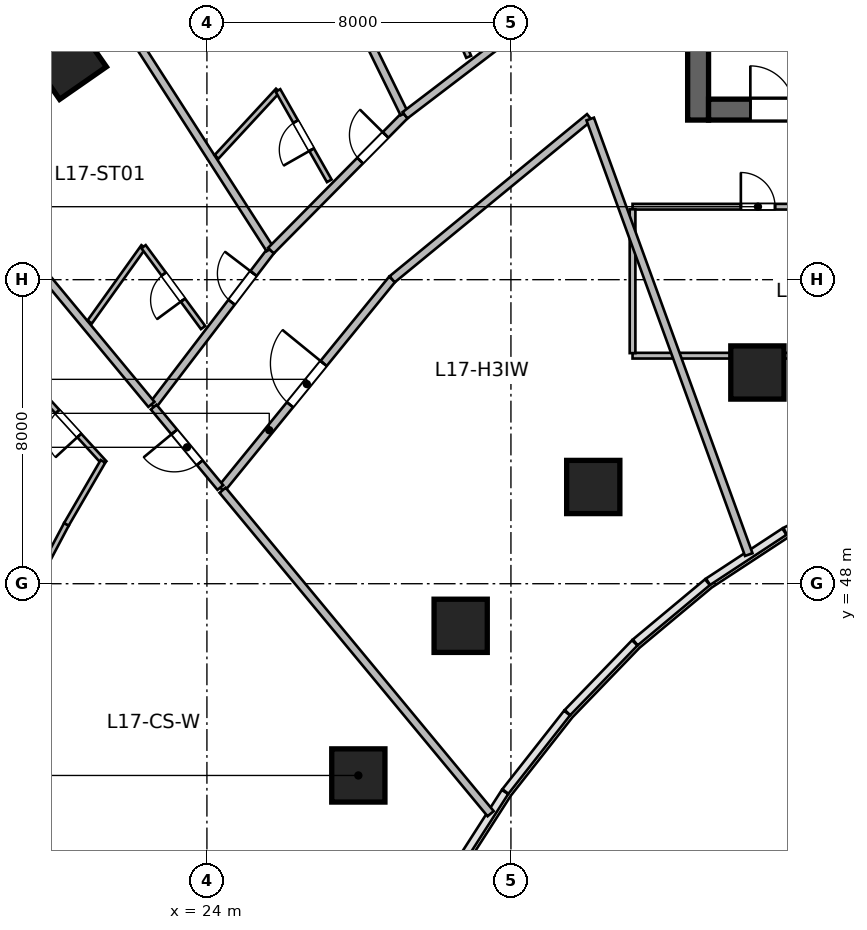
"""IFC4 building model, lengths in metres.
Left out: names, types, materials, properties, quantities, classifications, styles, units other than length and angle.
Written with IfcOpenShell. Run it as: python <this file> out.ifc"""

import sys

from ifc_helpers import new_model, si_unit, direction, frame, frame_2d, origin, origin_2d, place, context, subcontext, project, spatial, rectangle, circle, extrude, source, transform, mapped, element, fill, save


model = new_model("IFC4")
c1 = context("Model", 3, precision=1e-05, world=origin(), true_north=direction((0.0, 1.0)))
c2 = subcontext(c1, "Body", "Model", "MODEL_VIEW")
j1 = project(units=[si_unit("LENGTHUNIT", "METRE"), si_unit("PLANEANGLEUNIT", "RADIAN")], contexts=[c1])
p1 = place(None, origin())
s1 = spatial("IfcSite", under=j1, at=p1, CompositionType="ELEMENT")
p2 = place(p1, origin())
s2 = spatial("IfcBuilding", under=s1, at=p2, CompositionType="ELEMENT")
p3 = place(p2, frame((0.0, 0.0, 75.0)))
s3 = spatial("IfcBuildingStorey", under=s2, at=p3, CompositionType="ELEMENT", Elevation=75.0)
m1 = source(origin(), c2, "Body", "SweptSolid", [
    extrude(rectangle(XDim=12.0, YDim=0.55, at=frame_2d((6.0, 0.0))), origin(), (0.0, 0.0, 1.0), 3.6),
])
p4 = place(p3, frame((36.925, 60.2, 0.0), z_axis=(0.0, 0.0, 1.0), x_axis=(0.0, 1.0, 0.0)))
e1 = element("IfcWall", 1, at=p4, inside=s3, PredefinedType="SHEAR", context=c2, shape_type="MappedRepresentation", body=[
    mapped(m1, transform((0.0, 0.0, 0.0), scale=1.0)),
])
m2 = source(origin(), c2, "Body", "SweptSolid", [
    extrude(rectangle(XDim=21.6, YDim=0.55, at=frame_2d((10.8, 0.0))), origin(), (0.0, 0.0, 1.0), 3.6),
])
p5 = place(p3, frame((37.2, 60.475, 0.0), z_axis=(0.0, 0.0, 1.0), x_axis=(1.0, 0.0, 0.0)))
e2 = element("IfcWall", 2, at=p5, inside=s3, PredefinedType="SHEAR", context=c2, shape_type="MappedRepresentation", body=[
    mapped(m2, transform((0.0, 0.0, 0.0), scale=1.0)),
])
p6 = place(p5, frame((1.1, 0.0, 0.0)))
e3 = element("IfcOpeningElement", 3, at=p6, cuts=e2, PredefinedType="OPENING", context=c2, shape_type="SweptSolid", body=[
    extrude(rectangle(XDim=1.15, YDim=2.15, at=frame_2d((0.575, 1.075))), frame((0.0, 0.285, 0.0), z_axis=(0.0, -1.0, 0.0), x_axis=(1.0, 0.0, 0.0)), (0.0, 0.0, 1.0), 0.57),
])
p7 = place(p5, frame((19.5, 0.0, 0.0)))
e4 = element("IfcOpeningElement", 4, at=p7, cuts=e2, PredefinedType="OPENING", context=c2, shape_type="SweptSolid", body=[
    extrude(rectangle(XDim=0.9, YDim=2.1, at=frame_2d((0.45, 1.05))), frame((0.0, 0.285, 0.0), z_axis=(0.0, -1.0, 0.0), x_axis=(1.0, 0.0, 0.0)), (0.0, 0.0, 1.0), 0.57),
])
p8 = place(p5, frame((12.02, 0.0, 0.0)))
e5 = element("IfcOpeningElement", 5, at=p8, cuts=e2, PredefinedType="OPENING", context=c2, shape_type="SweptSolid", body=[
    extrude(rectangle(XDim=1.6, YDim=2.15, at=frame_2d((0.8, 1.075))), frame((0.0, 0.285, 0.0), z_axis=(0.0, -1.0, 0.0), x_axis=(1.0, 0.0, 0.0)), (0.0, 0.0, 1.0), 0.57),
])
m3 = source(origin(), c2, "Body", "SweptSolid", [
    extrude(circle(Radius=0.7, at=origin_2d()), origin(), (0.0, 0.0, 1.0), 3.6),
])
for number, where, z_axis, x_axis in (
    (6, (27.985, 42.955, 0.0), (0.0, 0.0, 1.0), (-0.691, 0.723, 0.0)),
    (7, (30.677, 46.892, 0.0), (0.0, 0.0, 1.0), (-0.571, 0.821, 0.0)),
):
    element("IfcColumn", number, at=place(p3, frame(where, z_axis=z_axis, x_axis=x_axis)), inside=s3, PredefinedType="COLUMN", context=c2, shape_type="MappedRepresentation", body=[
        mapped(m3, transform((0.0, 0.0, 0.0), scale=1.0)),
    ])
m4 = source(origin(), c2, "Body", "SweptSolid", [
    extrude(rectangle(XDim=1.5, YDim=1.5, at=origin_2d()), origin(), (0.0, 0.0, 1.0), 3.6),
])
p9 = place(p3, frame((20.311, 61.789, 0.0), z_axis=(0.0, 0.0, 1.0), x_axis=(-0.571143442153, 0.820850271661, 0.0)))
e8 = element("IfcColumn", 8, at=p9, inside=s3, PredefinedType="COLUMN", context=c2, shape_type="MappedRepresentation", body=[
    mapped(m4, transform((0.0, 0.0, 0.0), scale=1.0)),
])
for number, where, z_axis, x_axis in (
    (9, (34.166, 50.545, 0.0), (0.0, 0.0, 1.0), (-0.436, 0.9, 0.0)),
    (10, (38.485, 53.558, 0.0), (0.0, 0.0, 1.0), (-0.289, 0.957, 0.0)),
):
    element("IfcColumn", number, at=place(p3, frame(where, z_axis=z_axis, x_axis=x_axis)), inside=s3, PredefinedType="COLUMN", context=c2, shape_type="MappedRepresentation", body=[
        mapped(m3, transform((0.0, 0.0, 0.0), scale=1.0)),
    ])
m5 = source(origin(), c2, "Body", "SweptSolid", [
    extrude(rectangle(XDim=6.6, YDim=0.15, at=frame_2d((3.3, 0.0))), origin(), (0.0, 0.0, 1.0), 2.803),
])
p10 = place(p3, frame((35.2, 54.0, 0.0), z_axis=(0.0, 0.0, 1.0), x_axis=(1.0, 0.0, 0.0)))
e11 = element("IfcWall", 11, at=p10, inside=s3, PredefinedType="PARTITIONING", context=c2, shape_type="MappedRepresentation", body=[
    mapped(m5, transform((0.0, 0.0, 0.0), scale=1.0)),
])
m6 = source(origin(), c2, "Body", "SweptSolid", [
    extrude(rectangle(XDim=6.6, YDim=0.15, at=frame_2d((3.3, 0.0))), origin(), (0.0, 0.0, 1.0), 3.36),
])
p11 = place(p3, frame((35.2, 57.92, 0.0), z_axis=(0.0, 0.0, 1.0), x_axis=(1.0, 0.0, 0.0)))
e12 = element("IfcWall", 12, at=p11, inside=s3, PredefinedType="PARTITIONING", context=c2, shape_type="MappedRepresentation", body=[
    mapped(m6, transform((0.0, 0.0, 0.0), scale=1.0)),
])
p12 = place(p11, frame((2.85, 0.0, 0.0)))
e13 = element("IfcOpeningElement", 13, at=p12, cuts=e12, PredefinedType="OPENING", context=c2, shape_type="SweptSolid", body=[
    extrude(rectangle(XDim=0.9, YDim=2.1, at=frame_2d((0.45, 1.05))), frame((0.0, 0.085, 0.0), z_axis=(0.0, -1.0, 0.0), x_axis=(1.0, 0.0, 0.0)), (0.0, 0.0, 1.0), 0.17),
])
m7 = source(origin(), c2, "Body", "SweptSolid", [
    extrude(rectangle(XDim=3.785, YDim=0.15, at=frame_2d((1.893, 0.0))), origin(), (0.0, 0.0, 1.0), 3.36),
])
p13 = place(p3, frame((35.2, 54.067, 0.0), z_axis=(0.0, 0.0, 1.0), x_axis=(0.0, 1.0, 0.0)))
e14 = element("IfcWall", 14, at=p13, inside=s3, PredefinedType="PARTITIONING", context=c2, shape_type="MappedRepresentation", body=[
    mapped(m7, transform((0.0, 0.0, 0.0), scale=1.0)),
])
m8 = source(origin(), c2, "Body", "SweptSolid", [
    extrude(rectangle(XDim=7.113, YDim=0.21, at=frame_2d((3.556, 0.0))), origin(), (0.0, 0.0, 1.0), 3.36),
])
p14 = place(p3, frame((24.383, 50.495, 0.0), z_axis=(0.0, 0.0, 1.0), x_axis=(0.63149032532, 0.775383755974, 0.0)))
e15 = element("IfcWall", 15, at=p14, inside=s3, PredefinedType="PARTITIONING", context=c2, shape_type="MappedRepresentation", body=[
    mapped(m8, transform((0.0, 0.0, 0.0), scale=1.0)),
])
p15 = place(p14, frame((2.856, 0.0, 0.0)))
e16 = element("IfcOpeningElement", 16, at=p15, cuts=e15, PredefinedType="OPENING", context=c2, shape_type="SweptSolid", body=[
    extrude(rectangle(XDim=1.4, YDim=2.15, at=frame_2d((0.7, 1.075))), frame((0.0, 0.115, 0.0), z_axis=(0.0, -1.0, 0.0), x_axis=(1.0, 0.0, 0.0)), (0.0, 0.0, 1.0), 0.23),
])
m9 = source(origin(), c2, "Body", "SweptSolid", [
    extrude(rectangle(XDim=6.721, YDim=0.21, at=frame_2d((3.361, 0.0))), origin(), (0.0, 0.0, 1.0), 3.36),
])
p16 = place(p3, frame((28.874, 56.01, 0.0), z_axis=(0.0, 0.0, 1.0), x_axis=(0.772828051199, 0.63461547671, 0.0)))
e17 = element("IfcWall", 17, at=p16, inside=s3, PredefinedType="PARTITIONING", context=c2, shape_type="MappedRepresentation", body=[
    mapped(m9, transform((0.0, 0.0, 0.0), scale=1.0)),
])
m10 = source(origin(), c2, "Body", "SweptSolid", [
    extrude(rectangle(XDim=11.053, YDim=0.21, at=frame_2d((5.527, 0.0))), origin(), (0.0, 0.0, 1.0), 3.36),
])
p17 = place(p3, frame((31.466, 41.949, 0.0), z_axis=(0.0, 0.0, 1.0), x_axis=(-0.638131235571, 0.769927611005, 0.0)))
e18 = element("IfcWall", 18, at=p17, inside=s3, PredefinedType="PARTITIONING", context=c2, shape_type="MappedRepresentation", body=[
    mapped(m10, transform((0.0, 0.0, 0.0), scale=1.0)),
])
m11 = source(origin(), c2, "Body", "SweptSolid", [
    extrude(rectangle(XDim=12.196, YDim=0.21, at=frame_2d((6.098, 0.0))), origin(), (0.0, 0.0, 1.0), 3.36),
])
p18 = place(p3, frame((38.258, 48.766, 0.0), z_axis=(0.0, 0.0, 1.0), x_axis=(-0.342022711534, 0.939691686031, 0.0)))
e19 = element("IfcWall", 19, at=p18, inside=s3, PredefinedType="PARTITIONING", context=c2, shape_type="MappedRepresentation", body=[
    mapped(m11, transform((0.0, 0.0, 0.0), scale=1.0)),
])
m12 = source(origin(), c2, "Body", "SweptSolid", [
    extrude(rectangle(XDim=5.135, YDim=0.21, at=frame_2d((2.567, 0.0))), origin(), (0.0, 0.0, 1.0), 3.36),
])
p19 = place(p3, frame((22.57, 52.683, 0.0), z_axis=(0.0, 0.0, 1.0), x_axis=(0.606802199649, 0.794852873494, 0.0)))
e20 = element("IfcWall", 20, at=p19, inside=s3, PredefinedType="PARTITIONING", context=c2, shape_type="MappedRepresentation", body=[
    mapped(m12, transform((0.0, 0.0, 0.0), scale=1.0)),
])
p20 = place(p19, frame((3.427, 0.0, 0.0)))
e21 = element("IfcOpeningElement", 21, at=p20, cuts=e20, PredefinedType="OPENING", context=c2, shape_type="SweptSolid", body=[
    extrude(rectangle(XDim=0.95, YDim=2.15, at=frame_2d((0.475, 1.075))), frame((0.0, 0.115, 0.0), z_axis=(0.0, -1.0, 0.0), x_axis=(1.0, 0.0, 0.0)), (0.0, 0.0, 1.0), 0.23),
])
m13 = source(origin(), c2, "Body", "SweptSolid", [
    extrude(rectangle(XDim=10.975, YDim=0.21, at=frame_2d((5.487, 0.0))), origin(), (0.0, 0.0, 1.0), 3.36),
])
p21 = place(p3, frame((22.54, 52.719, 0.0), z_axis=(0.0, 0.0, 1.0), x_axis=(-0.638125265812, 0.769932558821, 0.0)))
e22 = element("IfcWall", 22, at=p21, inside=s3, PredefinedType="PARTITIONING", context=c2, shape_type="MappedRepresentation", body=[
    mapped(m13, transform((0.0, 0.0, 0.0), scale=1.0)),
])
m14 = source(origin(), c2, "Body", "SweptSolid", [
    extrude(rectangle(XDim=11.432, YDim=0.21, at=frame_2d((5.716, 0.0))), origin(), (0.0, 0.0, 1.0), 3.36),
])
p22 = place(p3, frame((25.659, 56.805, 0.0), z_axis=(0.0, 0.0, 1.0), x_axis=(-0.540196183124, 0.841539115988, 0.0)))
e23 = element("IfcWall", 23, at=p22, inside=s3, PredefinedType="PARTITIONING", context=c2, shape_type="MappedRepresentation", body=[
    mapped(m14, transform((0.0, 0.0, 0.0), scale=1.0)),
])
m15 = source(origin(), c2, "Body", "SweptSolid", [
    extrude(rectangle(XDim=2.437, YDim=0.14, at=frame_2d((1.218, 0.0))), origin(), (0.0, 0.0, 1.0), 3.36),
])
p23 = place(p3, frame((20.915, 54.886, 0.0), z_axis=(0.0, 0.0, 1.0), x_axis=(0.581797219134, 0.813333877204, 0.0)))
e24 = element("IfcWall", 24, at=p23, inside=s3, PredefinedType="PARTITIONING", context=c2, shape_type="MappedRepresentation", body=[
    mapped(m15, transform((0.0, 0.0, 0.0), scale=1.0)),
])
m16 = source(origin(), c2, "Body", "SweptSolid", [
    extrude(rectangle(XDim=2.642, YDim=0.14, at=frame_2d((1.321, 0.0))), origin(), (0.0, 0.0, 1.0), 3.36),
])
p24 = place(p3, frame((23.899, 54.741, 0.0), z_axis=(0.0, 0.0, 1.0), x_axis=(-0.592789122423, 0.805357719487, 0.0)))
e25 = element("IfcWall", 25, at=p24, inside=s3, PredefinedType="PARTITIONING", context=c2, shape_type="MappedRepresentation", body=[
    mapped(m16, transform((0.0, 0.0, 0.0), scale=1.0)),
])
p25 = place(p24, frame((0.896, 0.0, 0.0)))
e26 = element("IfcOpeningElement", 26, at=p25, cuts=e25, PredefinedType="OPENING", context=c2, shape_type="SweptSolid", body=[
    extrude(rectangle(XDim=0.85, YDim=2.05, at=frame_2d((0.425, 1.025))), frame((0.0, 0.08, 0.0), z_axis=(0.0, -1.0, 0.0), x_axis=(1.0, 0.0, 0.0)), (0.0, 0.0, 1.0), 0.16),
])
m17 = source(origin(), c2, "Body", "SweptSolid", [
    extrude(rectangle(XDim=5.012, YDim=0.21, at=frame_2d((2.506, 0.0))), origin(), (0.0, 0.0, 1.0), 3.36),
])
p26 = place(p3, frame((25.685, 56.764, 0.0), z_axis=(0.0, 0.0, 1.0), x_axis=(0.703664626435, 0.710532260707, 0.0)))
e27 = element("IfcWall", 27, at=p26, inside=s3, PredefinedType="PARTITIONING", context=c2, shape_type="MappedRepresentation", body=[
    mapped(m17, transform((0.0, 0.0, 0.0), scale=1.0)),
])
p27 = place(p26, frame((3.335, 0.0, 0.0)))
e28 = element("IfcOpeningElement", 28, at=p27, cuts=e27, PredefinedType="OPENING", context=c2, shape_type="SweptSolid", body=[
    extrude(rectangle(XDim=0.95, YDim=2.15, at=frame_2d((0.475, 1.075))), frame((0.0, 0.115, 0.0), z_axis=(0.0, -1.0, 0.0), x_axis=(1.0, 0.0, 0.0)), (0.0, 0.0, 1.0), 0.23),
])
m18 = source(origin(), c2, "Body", "SweptSolid", [
    extrude(rectangle(XDim=11.775, YDim=0.21, at=frame_2d((5.887, 0.0))), origin(), (0.0, 0.0, 1.0), 2.644),
])
p28 = place(p3, frame((29.19, 60.371, 0.0), z_axis=(0.0, 0.0, 1.0), x_axis=(-0.4401500056, 0.897924257702, 0.0)))
e29 = element("IfcWall", 29, at=p28, inside=s3, PredefinedType="PARTITIONING", context=c2, shape_type="MappedRepresentation", body=[
    mapped(m18, transform((0.0, 0.0, 0.0), scale=1.0)),
])
m19 = source(origin(), c2, "Body", "SweptSolid", [
    extrude(rectangle(XDim=2.38, YDim=0.14, at=frame_2d((1.19, 0.0))), origin(), (0.0, 0.0, 1.0), 3.36),
])
p29 = place(p3, frame((24.253, 59.231, 0.0), z_axis=(0.0, 0.0, 1.0), x_axis=(0.679084816758, 0.734059814762, 0.0)))
e30 = element("IfcWall", 30, at=p29, inside=s3, PredefinedType="PARTITIONING", context=c2, shape_type="MappedRepresentation", body=[
    mapped(m19, transform((0.0, 0.0, 0.0), scale=1.0)),
])
m20 = source(origin(), c2, "Body", "SweptSolid", [
    extrude(rectangle(XDim=2.735, YDim=0.14, at=frame_2d((1.367, 0.0))), origin(), (0.0, 0.0, 1.0), 3.36),
])
p30 = place(p3, frame((27.219, 58.6, 0.0), z_axis=(0.0, 0.0, 1.0), x_axis=(-0.493694940578, 0.869635156631, 0.0)))
e31 = element("IfcWall", 31, at=p30, inside=s3, PredefinedType="PARTITIONING", context=c2, shape_type="MappedRepresentation", body=[
    mapped(m20, transform((0.0, 0.0, 0.0), scale=1.0)),
])
p31 = place(p30, frame((0.942, 0.0, 0.0)))
e32 = element("IfcOpeningElement", 32, at=p31, cuts=e31, PredefinedType="OPENING", context=c2, shape_type="SweptSolid", body=[
    extrude(rectangle(XDim=0.85, YDim=2.05, at=frame_2d((0.425, 1.025))), frame((0.0, 0.08, 0.0), z_axis=(0.0, -1.0, 0.0), x_axis=(1.0, 0.0, 0.0)), (0.0, 0.0, 1.0), 0.16),
])
m21 = source(origin(), c2, "Body", "SweptSolid", [
    extrude(rectangle(XDim=4.762, YDim=0.21, at=frame_2d((2.381, 0.0))), origin(), (0.0, 0.0, 1.0), 3.36),
])
p32 = place(p3, frame((29.212, 60.326, 0.0), z_axis=(0.0, 0.0, 1.0), x_axis=(0.795070295872, 0.60651729128, 0.0)))
e33 = element("IfcWall", 33, at=p32, inside=s3, PredefinedType="PARTITIONING", context=c2, shape_type="MappedRepresentation", body=[
    mapped(m21, transform((0.0, 0.0, 0.0), scale=1.0)),
])
p33 = place(p32, frame((3.144, 0.0, 0.0)))
e34 = element("IfcOpeningElement", 34, at=p33, cuts=e33, PredefinedType="OPENING", context=c2, shape_type="SweptSolid", body=[
    extrude(rectangle(XDim=0.95, YDim=2.15, at=frame_2d((0.475, 1.075))), frame((0.0, 0.115, 0.0), z_axis=(0.0, -1.0, 0.0), x_axis=(1.0, 0.0, 0.0)), (0.0, 0.0, 1.0), 0.23),
])
m22 = source(origin(), c2, "Body", "SweptSolid", [
    extrude(rectangle(XDim=2.819, YDim=0.14, at=frame_2d((1.409, 0.0))), origin(), (0.0, 0.0, 1.0), 3.36),
])
p34 = place(p3, frame((30.888, 61.864, 0.0), z_axis=(0.0, 0.0, 1.0), x_axis=(-0.394420979357, 0.918929861874, 0.0)))
e35 = element("IfcWall", 35, at=p34, inside=s3, PredefinedType="PARTITIONING", context=c2, shape_type="MappedRepresentation", body=[
    mapped(m22, transform((0.0, 0.0, 0.0), scale=1.0)),
])
p35 = place(p34, frame((0.984, 0.0, 0.0)))
e36 = element("IfcOpeningElement", 36, at=p35, cuts=e35, PredefinedType="OPENING", context=c2, shape_type="SweptSolid", body=[
    extrude(rectangle(XDim=0.85, YDim=2.05, at=frame_2d((0.425, 1.025))), frame((0.0, 0.08, 0.0), z_axis=(0.0, -1.0, 0.0), x_axis=(1.0, 0.0, 0.0)), (0.0, 0.0, 1.0), 0.16),
])
m23 = source(origin(), c2, "Body", "SweptSolid", [
    extrude(rectangle(XDim=2.748, YDim=0.195, at=frame_2d((1.374, 0.0))), origin(), (0.0, 0.0, 1.0), 3.36),
])
p36 = place(p3, frame((24.353, 50.531, 0.0), z_axis=(0.0, 0.0, 1.0), x_axis=(-0.638111168284, 0.769944242729, 0.0)))
e37 = element("IfcWall", 37, at=p36, inside=s3, PredefinedType="PARTITIONING", context=c2, shape_type="MappedRepresentation", body=[
    mapped(m23, transform((0.0, 0.0, 0.0), scale=1.0)),
])
p37 = place(p36, frame((0.849, 0.0, 0.0)))
e38 = element("IfcOpeningElement", 38, at=p37, cuts=e37, PredefinedType="OPENING", context=c2, shape_type="SweptSolid", body=[
    extrude(rectangle(XDim=1.05, YDim=2.15, at=frame_2d((0.525, 1.075))), frame((0.0, 0.107, 0.0), z_axis=(0.0, -1.0, 0.0), x_axis=(1.0, 0.0, 0.0)), (0.0, 0.0, 1.0), 0.215),
])
m24 = source(origin(), c2, "Body", "SweptSolid", [
    extrude(rectangle(XDim=2.812, YDim=0.14, at=frame_2d((1.406, 0.0))), origin(), (0.0, 0.0, 1.0), 3.36),
])
p38 = place(p3, frame((21.303, 51.177, 0.0), z_axis=(0.0, 0.0, 1.0), x_axis=(-0.675119025852, 0.737708818527, 0.0)))
e39 = element("IfcWall", 39, at=p38, inside=s3, PredefinedType="PARTITIONING", context=c2, shape_type="MappedRepresentation", body=[
    mapped(m24, transform((0.0, 0.0, 0.0), scale=1.0)),
])
p39 = place(p38, frame((0.981, 0.0, 0.0)))
e40 = element("IfcOpeningElement", 40, at=p39, cuts=e39, PredefinedType="OPENING", context=c2, shape_type="SweptSolid", body=[
    extrude(rectangle(XDim=0.85, YDim=2.05, at=frame_2d((0.425, 1.025))), frame((0.0, 0.08, 0.0), z_axis=(0.0, -1.0, 0.0), x_axis=(1.0, 0.0, 0.0)), (0.0, 0.0, 1.0), 0.16),
])
m25 = source(origin(), c2, "Body", "SweptSolid", [
    extrude(rectangle(XDim=1.936, YDim=0.14, at=frame_2d((0.968, 0.0))), origin(), (0.0, 0.0, 1.0), 3.36),
])
p40 = place(p3, frame((19.398, 47.852, 0.0), z_axis=(0.0, 0.0, 1.0), x_axis=(0.467174971862, 0.884164886017, 0.0)))
e41 = element("IfcWall", 41, at=p40, inside=s3, PredefinedType="PARTITIONING", context=c2, shape_type="MappedRepresentation", body=[
    mapped(m25, transform((0.0, 0.0, 0.0), scale=1.0)),
])
m26 = source(origin(), c2, "Body", "SweptSolid", [
    extrude(rectangle(XDim=1.914, YDim=0.14, at=frame_2d((0.957, 0.0))), origin(), (0.0, 0.0, 1.0), 3.36),
])
p41 = place(p3, frame((20.303, 49.563, 0.0), z_axis=(0.0, 0.0, 1.0), x_axis=(0.502347790612, 0.864665656347, 0.0)))
e42 = element("IfcWall", 42, at=p41, inside=s3, PredefinedType="PARTITIONING", context=c2, shape_type="MappedRepresentation", body=[
    mapped(m26, transform((0.0, 0.0, 0.0), scale=1.0)),
])
m27 = source(origin(), c2, "Body", "SweptSolid", [
    extrude(rectangle(XDim=1.15, YDim=2.15, at=frame_2d((0.575, 1.075))), frame((0.0, 0.025, 0.0), z_axis=(0.0, -1.0, 0.0), x_axis=(1.0, 0.0, 0.0)), (0.0, 0.0, 1.0), 0.05),
])
p42 = place(p6, origin())
e43 = element("IfcDoor", 43, at=p42, inside=s3, OperationType="SINGLE_SWING_LEFT", PredefinedType="DOOR", context=c2, shape_type="MappedRepresentation", body=[
    mapped(m27, transform((0.0, 0.0, 0.0), scale=1.0)),
])
fill(e3, e43)
m28 = source(origin(), c2, "Body", "SweptSolid", [
    extrude(rectangle(XDim=0.9, YDim=2.1, at=frame_2d((0.45, 1.05))), frame((0.0, 0.025, 0.0), z_axis=(0.0, -1.0, 0.0), x_axis=(1.0, 0.0, 0.0)), (0.0, 0.0, 1.0), 0.05),
])
p43 = place(p12, origin())
e44 = element("IfcDoor", 44, at=p43, inside=s3, OperationType="SINGLE_SWING_LEFT", PredefinedType="DOOR", context=c2, shape_type="MappedRepresentation", body=[
    mapped(m28, transform((0.0, 0.0, 0.0), scale=1.0)),
])
fill(e13, e44)
m29 = source(origin(), c2, "Body", "SweptSolid", [
    extrude(rectangle(XDim=1.4, YDim=2.15, at=frame_2d((0.7, 1.075))), frame((0.0, 0.025, 0.0), z_axis=(0.0, -1.0, 0.0), x_axis=(1.0, 0.0, 0.0)), (0.0, 0.0, 1.0), 0.05),
])
p44 = place(p15, origin())
e45 = element("IfcDoor", 45, at=p44, inside=s3, OperationType="SINGLE_SWING_RIGHT", PredefinedType="DOOR", context=c2, shape_type="MappedRepresentation", body=[
    mapped(m29, transform((0.0, 0.0, 0.0), scale=1.0)),
])
fill(e16, e45)
m30 = source(origin(), c2, "Body", "SweptSolid", [
    extrude(rectangle(XDim=0.95, YDim=2.15, at=frame_2d((0.475, 1.075))), frame((0.0, 0.025, 0.0), z_axis=(0.0, -1.0, 0.0), x_axis=(1.0, 0.0, 0.0)), (0.0, 0.0, 1.0), 0.05),
])
p45 = place(p20, origin())
e46 = element("IfcDoor", 46, at=p45, inside=s3, OperationType="SINGLE_SWING_RIGHT", PredefinedType="DOOR", context=c2, shape_type="MappedRepresentation", body=[
    mapped(m30, transform((0.0, 0.0, 0.0), scale=1.0)),
])
fill(e21, e46)
m31 = source(origin(), c2, "Body", "SweptSolid", [
    extrude(rectangle(XDim=0.85, YDim=2.05, at=frame_2d((0.425, 1.025))), frame((0.0, 0.025, 0.0), z_axis=(0.0, -1.0, 0.0), x_axis=(1.0, 0.0, 0.0)), (0.0, 0.0, 1.0), 0.05),
])
p46 = place(p25, origin())
e47 = element("IfcDoor", 47, at=p46, inside=s3, OperationType="SINGLE_SWING_LEFT", PredefinedType="DOOR", context=c2, shape_type="MappedRepresentation", body=[
    mapped(m31, transform((0.0, 0.0, 0.0), scale=1.0)),
])
fill(e26, e47)
p47 = place(p27, origin())
e48 = element("IfcDoor", 48, at=p47, inside=s3, OperationType="SINGLE_SWING_RIGHT", PredefinedType="DOOR", context=c2, shape_type="MappedRepresentation", body=[
    mapped(m30, transform((0.0, 0.0, 0.0), scale=1.0)),
])
fill(e28, e48)
p48 = place(p31, origin())
e49 = element("IfcDoor", 49, at=p48, inside=s3, OperationType="SINGLE_SWING_LEFT", PredefinedType="DOOR", context=c2, shape_type="MappedRepresentation", body=[
    mapped(m31, transform((0.0, 0.0, 0.0), scale=1.0)),
])
fill(e32, e49)
m32 = source(origin(), c2, "Body", "SweptSolid", [
    extrude(rectangle(XDim=1.05, YDim=2.15, at=frame_2d((0.525, 1.075))), frame((0.0, 0.025, 0.0), z_axis=(0.0, -1.0, 0.0), x_axis=(1.0, 0.0, 0.0)), (0.0, 0.0, 1.0), 0.05),
])
p49 = place(p37, origin())
e50 = element("IfcDoor", 50, at=p49, inside=s3, OperationType="SINGLE_SWING_RIGHT", PredefinedType="DOOR", context=c2, shape_type="MappedRepresentation", body=[
    mapped(m32, transform((0.0, 0.0, 0.0), scale=1.0)),
])
fill(e38, e50)
p50 = place(p39, origin())
e51 = element("IfcDoor", 51, at=p50, inside=s3, OperationType="SINGLE_SWING_LEFT", PredefinedType="DOOR", context=c2, shape_type="MappedRepresentation", body=[
    mapped(m31, transform((0.0, 0.0, 0.0), scale=1.0)),
])
fill(e40, e51)
save(model, sys.argv[1])
